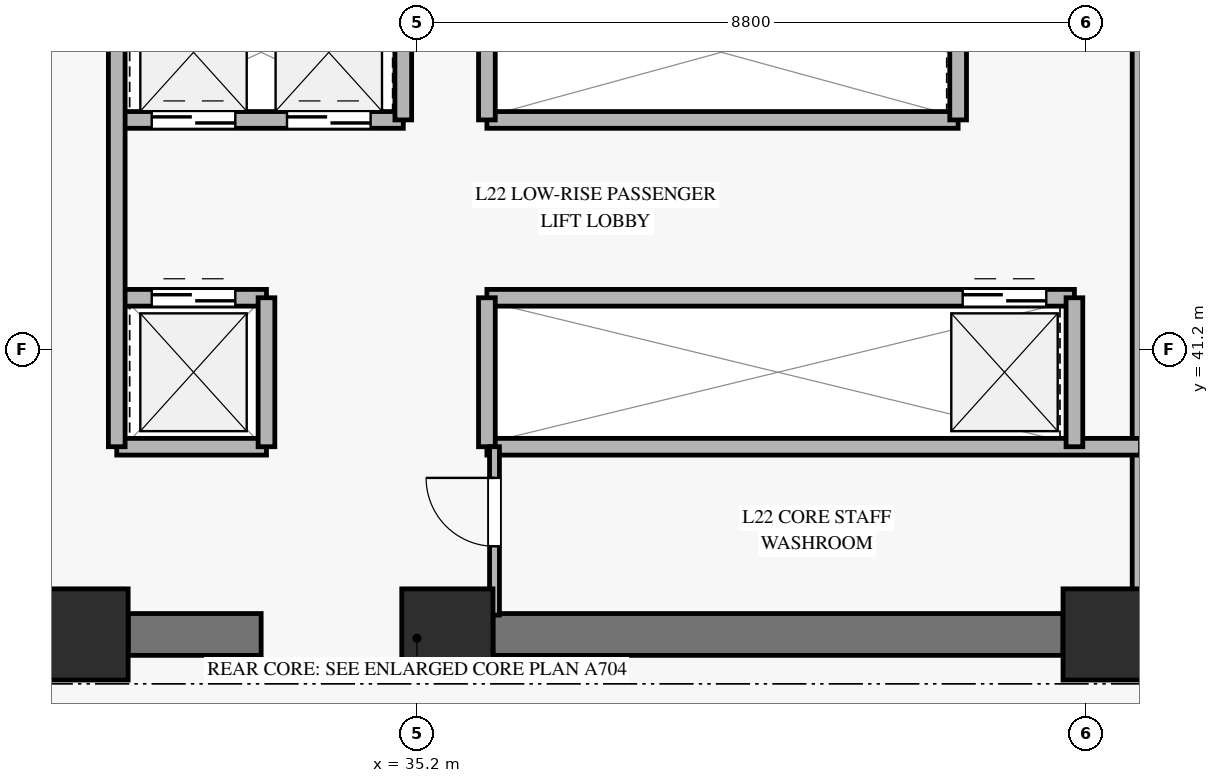
"""IFC4 building model, lengths in metres.
Left out: names, types, materials, properties, quantities, classifications, styles, units other than length and angle.
Written with IfcOpenShell. Run it as: python <this file> out.ifc"""

import sys

from ifc_helpers import new_model, si_unit, direction, frame, frame_2d, origin, origin_2d, place, context, subcontext, project, spatial, rectangle, extrude, source, transform, mapped, element, fill, save


model = new_model("IFC4")
c1 = context("Model", 3, precision=1e-05, world=origin(), true_north=direction((0.0, 1.0)))
c2 = subcontext(c1, "Body", "Model", "MODEL_VIEW")
j1 = project(units=[si_unit("LENGTHUNIT", "METRE"), si_unit("PLANEANGLEUNIT", "RADIAN")], contexts=[c1])
p1 = place(None, origin())
s1 = spatial("IfcSite", under=j1, at=p1, CompositionType="ELEMENT")
p2 = place(p1, origin())
s2 = spatial("IfcBuilding", under=s1, at=p2, CompositionType="ELEMENT")
p3 = place(p2, frame((0.0, 0.0, 91.3)))
s3 = spatial("IfcBuildingStorey", under=s2, at=p3, CompositionType="ELEMENT", Elevation=91.3)
m1 = source(origin(), c2, "Body", "SweptSolid", [
    extrude(rectangle(XDim=1.2, YDim=1.2, at=origin_2d()), origin(), (0.0, 0.0, 1.0), 3.62),
])
for number, where, z_axis, x_axis in (
    (1, (30.8, 37.45, 0.0), (0.0, 0.0, 1.0), (1.0, 0.0, 0.0)),
    (2, (35.6, 37.45, 0.0), (0.0, 0.0, 1.0), (1.0, 0.0, 0.0)),
    (3, (44.3, 37.45, 0.0), (0.0, 0.0, 1.0), (1.0, 0.0, 0.0)),
):
    element("IfcColumn", number, at=place(p3, frame(where, z_axis=z_axis, x_axis=x_axis)), inside=s3, PredefinedType="PILASTER", context=c2, shape_type="MappedRepresentation", body=[
        mapped(m1, transform((0.0, 0.0, 0.0), x_axis=(1.0, 0.0, 0.0), y_axis=(0.0, 1.0, 0.0), z_axis=(0.0, 0.0, 1.0), scale=1.0)),
    ])
p4 = place(p3, frame((31.4, 37.45, 0.0), z_axis=(0.0, 0.0, 1.0), x_axis=(1.0, 0.0, 0.0)))
e4 = element("IfcWall", 4, at=p4, inside=s3, PredefinedType="SHEAR", context=c2, shape_type="SweptSolid", body=[
    extrude(rectangle(XDim=1.75, YDim=0.55, at=frame_2d((0.875, 0.0))), origin(), (0.0, 0.0, 1.0), 3.62),
])
p5 = place(p3, frame((36.2, 37.45, 0.0), z_axis=(0.0, 0.0, 1.0), x_axis=(1.0, 0.0, 0.0)))
e5 = element("IfcWall", 5, at=p5, inside=s3, PredefinedType="SHEAR", context=c2, shape_type="SweptSolid", body=[
    extrude(rectangle(XDim=7.5, YDim=0.55, at=frame_2d((3.75, 0.0))), origin(), (0.0, 0.0, 1.0), 3.62),
])
p6 = place(p3, frame((44.72, 37.705, 0.0), z_axis=(0.0, 0.0, 1.0), x_axis=(0.0, 1.0, 0.0)))
e6 = element("IfcWall", 6, at=p6, inside=s3, PredefinedType="SOLIDWALL", context=c2, shape_type="SweptSolid", body=[
    extrude(rectangle(XDim=7.515, YDim=0.22, at=frame_2d((3.757, 0.0))), origin(), (0.0, 0.0, 1.0), 3.62),
])
p7 = place(p3, frame((31.25, 44.22, 0.0), z_axis=(0.0, 0.0, 1.0), x_axis=(1.0, 0.0, 0.0)))
e7 = element("IfcWall", 7, at=p7, inside=s3, PredefinedType="SOLIDWALL", context=c2, shape_type="SweptSolid", body=[
    extrude(rectangle(XDim=3.77, YDim=0.22, at=frame_2d((1.885, 0.0))), origin(), (0.0, 0.0, 1.0), 3.62),
])
p8 = place(p7, frame((0.46, 0.0, 0.0)))
e8 = element("IfcOpeningElement", 8, at=p8, cuts=e7, PredefinedType="OPENING", context=c2, shape_type="SweptSolid", body=[
    extrude(rectangle(XDim=1.1, YDim=2.2, at=frame_2d((0.55, 1.1))), frame((0.0, 0.12, 0.0), z_axis=(0.0, -1.0, 0.0), x_axis=(1.0, 0.0, 0.0)), (0.0, 0.0, 1.0), 0.24),
])
p9 = place(p7, frame((2.24, 0.0, 0.0)))
e9 = element("IfcOpeningElement", 9, at=p9, cuts=e7, PredefinedType="OPENING", context=c2, shape_type="SweptSolid", body=[
    extrude(rectangle(XDim=1.1, YDim=2.2, at=frame_2d((0.55, 1.1))), frame((0.0, 0.12, 0.0), z_axis=(0.0, -1.0, 0.0), x_axis=(1.0, 0.0, 0.0)), (0.0, 0.0, 1.0), 0.24),
])
p10 = place(p3, frame((36.12, 44.22, 0.0), z_axis=(0.0, 0.0, 1.0), x_axis=(1.0, 0.0, 0.0)))
e10 = element("IfcWall", 10, at=p10, inside=s3, PredefinedType="SOLIDWALL", context=c2, shape_type="SweptSolid", body=[
    extrude(rectangle(XDim=6.2, YDim=0.22, at=frame_2d((3.1, 0.0))), origin(), (0.0, 0.0, 1.0), 3.62),
])
for number, where, z_axis, x_axis in (
    (11, (35.02, 44.22, 0.0), (0.0, 0.0, 1.0), (0.0, 1.0, 0.0)),
    (12, (36.12, 44.22, 0.0), (0.0, 0.0, 1.0), (0.0, 1.0, 0.0)),
    (13, (42.32, 44.22, 0.0), (0.0, 0.0, 1.0), (0.0, 1.0, 0.0)),
):
    element("IfcWall", number, at=place(p3, frame(where, z_axis=z_axis, x_axis=x_axis)), inside=s3, PredefinedType="SOLIDWALL", context=c2, shape_type="SweptSolid", body=[
        extrude(rectangle(XDim=2.075, YDim=0.22, at=frame_2d((1.038, 0.0))), origin(), (0.0, 0.0, 1.0), 3.62),
    ])
p11 = place(p3, frame((31.25, 41.88, 0.0), z_axis=(0.0, 0.0, 1.0), x_axis=(1.0, 0.0, 0.0)))
e14 = element("IfcWall", 14, at=p11, inside=s3, PredefinedType="SOLIDWALL", context=c2, shape_type="SweptSolid", body=[
    extrude(rectangle(XDim=1.97, YDim=0.22, at=frame_2d((0.985, 0.0))), origin(), (0.0, 0.0, 1.0), 3.62),
])
p12 = place(p11, frame((0.46, 0.0, 0.0)))
e15 = element("IfcOpeningElement", 15, at=p12, cuts=e14, PredefinedType="OPENING", context=c2, shape_type="SweptSolid", body=[
    extrude(rectangle(XDim=1.1, YDim=2.2, at=frame_2d((0.55, 1.1))), frame((0.0, 0.12, 0.0), z_axis=(0.0, -1.0, 0.0), x_axis=(1.0, 0.0, 0.0)), (0.0, 0.0, 1.0), 0.24),
])
p13 = place(p3, frame((36.12, 41.88, 0.0), z_axis=(0.0, 0.0, 1.0), x_axis=(1.0, 0.0, 0.0)))
e16 = element("IfcWall", 16, at=p13, inside=s3, PredefinedType="SOLIDWALL", context=c2, shape_type="SweptSolid", body=[
    extrude(rectangle(XDim=7.73, YDim=0.22, at=frame_2d((3.865, 0.0))), origin(), (0.0, 0.0, 1.0), 3.62),
])
p14 = place(p13, frame((6.26, 0.0, 0.0)))
e17 = element("IfcOpeningElement", 17, at=p14, cuts=e16, PredefinedType="OPENING", context=c2, shape_type="SweptSolid", body=[
    extrude(rectangle(XDim=1.1, YDim=2.2, at=frame_2d((0.55, 1.1))), frame((0.0, 0.12, 0.0), z_axis=(0.0, -1.0, 0.0), x_axis=(1.0, 0.0, 0.0)), (0.0, 0.0, 1.0), 0.24),
])
p15 = place(p3, frame((31.25, 39.92, 0.0), z_axis=(0.0, 0.0, 1.0), x_axis=(1.0, 0.0, 0.0)))
e18 = element("IfcWall", 18, at=p15, inside=s3, PredefinedType="SOLIDWALL", context=c2, shape_type="SweptSolid", body=[
    extrude(rectangle(XDim=1.97, YDim=0.22, at=frame_2d((0.985, 0.0))), origin(), (0.0, 0.0, 1.0), 3.62),
])
p16 = place(p3, frame((33.22, 39.92, 0.0), z_axis=(0.0, 0.0, 1.0), x_axis=(0.0, 1.0, 0.0)))
e19 = element("IfcWall", 19, at=p16, inside=s3, PredefinedType="SOLIDWALL", context=c2, shape_type="SweptSolid", body=[
    extrude(rectangle(XDim=1.96, YDim=0.22, at=frame_2d((0.98, 0.0))), origin(), (0.0, 0.0, 1.0), 3.62),
])
p17 = place(p3, frame((36.12, 39.92, 0.0), z_axis=(0.0, 0.0, 1.0), x_axis=(1.0, 0.0, 0.0)))
e20 = element("IfcWall", 20, at=p17, inside=s3, PredefinedType="SOLIDWALL", context=c2, shape_type="SweptSolid", body=[
    extrude(rectangle(XDim=8.6, YDim=0.22, at=frame_2d((4.3, 0.0))), origin(), (0.0, 0.0, 1.0), 2.905),
])
p18 = place(p3, frame((36.12, 39.92, 0.0), z_axis=(0.0, 0.0, 1.0), x_axis=(0.0, 1.0, 0.0)))
e21 = element("IfcWall", 21, at=p18, inside=s3, PredefinedType="SOLIDWALL", context=c2, shape_type="SweptSolid", body=[
    extrude(rectangle(XDim=1.96, YDim=0.22, at=frame_2d((0.98, 0.0))), origin(), (0.0, 0.0, 1.0), 3.62),
])
p19 = place(p3, frame((31.25, 39.92, 0.0), z_axis=(0.0, 0.0, 1.0), x_axis=(0.0, 1.0, 0.0)))
e22 = element("IfcWall", 22, at=p19, inside=s3, PredefinedType="SOLIDWALL", context=c2, shape_type="SweptSolid", body=[
    extrude(rectangle(XDim=6.375, YDim=0.22, at=frame_2d((3.188, 0.0))), origin(), (0.0, 0.0, 1.0), 3.62),
])
p20 = place(p3, frame((43.85, 39.92, 0.0), z_axis=(0.0, 0.0, 1.0), x_axis=(0.0, 1.0, 0.0)))
e23 = element("IfcWall", 23, at=p20, inside=s3, PredefinedType="SOLIDWALL", context=c2, shape_type="SweptSolid", body=[
    extrude(rectangle(XDim=1.96, YDim=0.22, at=frame_2d((0.98, 0.0))), origin(), (0.0, 0.0, 1.0), 3.62),
])
p21 = place(p3, frame((36.22, 37.705, 0.0), z_axis=(0.0, 0.0, 1.0), x_axis=(0.0, 1.0, 0.0)))
e24 = element("IfcWall", 24, at=p21, inside=s3, PredefinedType="PARTITIONING", context=c2, shape_type="SweptSolid", body=[
    extrude(rectangle(XDim=2.215, YDim=0.13, at=frame_2d((1.107, 0.0))), origin(), (0.0, 0.0, 1.0), 3.62),
])
p22 = place(p21, frame((0.905, 0.0, 0.0)))
e25 = element("IfcOpeningElement", 25, at=p22, cuts=e24, PredefinedType="OPENING", context=c2, shape_type="SweptSolid", body=[
    extrude(rectangle(XDim=0.9, YDim=2.1, at=frame_2d((0.45, 1.05))), frame((0.0, 0.075, 0.0), z_axis=(0.0, -1.0, 0.0), x_axis=(1.0, 0.0, 0.0)), (0.0, 0.0, 1.0), 0.15),
])
m2 = source(origin(), c2, "Body", "SweptSolid", [
    extrude(rectangle(XDim=1.1, YDim=2.2, at=frame_2d((0.55, 1.1))), frame((0.0, 0.025, 0.0), z_axis=(0.0, -1.0, 0.0), x_axis=(1.0, 0.0, 0.0)), (0.0, 0.0, 1.0), 0.05),
])
p23 = place(p8, origin())
e26 = element("IfcDoor", 26, at=p23, inside=s3, OperationType="SLIDING_TO_LEFT", PredefinedType="DOOR", context=c2, shape_type="MappedRepresentation", body=[
    mapped(m2, transform((0.0, 0.0, 0.0), x_axis=(1.0, 0.0, 0.0), y_axis=(0.0, 1.0, 0.0), z_axis=(0.0, 0.0, 1.0), scale=1.0)),
])
fill(e8, e26)
p24 = place(p9, origin())
e27 = element("IfcDoor", 27, at=p24, inside=s3, OperationType="SLIDING_TO_LEFT", PredefinedType="DOOR", context=c2, shape_type="MappedRepresentation", body=[
    mapped(m2, transform((0.0, 0.0, 0.0), x_axis=(1.0, 0.0, 0.0), y_axis=(0.0, 1.0, 0.0), z_axis=(0.0, 0.0, 1.0), scale=1.0)),
])
fill(e9, e27)
p25 = place(p12, origin())
e28 = element("IfcDoor", 28, at=p25, inside=s3, OperationType="SLIDING_TO_LEFT", PredefinedType="DOOR", context=c2, shape_type="MappedRepresentation", body=[
    mapped(m2, transform((0.0, 0.0, 0.0), x_axis=(1.0, 0.0, 0.0), y_axis=(0.0, 1.0, 0.0), z_axis=(0.0, 0.0, 1.0), scale=1.0)),
])
fill(e15, e28)
p26 = place(p14, origin())
e29 = element("IfcDoor", 29, at=p26, inside=s3, OperationType="SLIDING_TO_LEFT", PredefinedType="DOOR", context=c2, shape_type="MappedRepresentation", body=[
    mapped(m2, transform((0.0, 0.0, 0.0), x_axis=(1.0, 0.0, 0.0), y_axis=(0.0, 1.0, 0.0), z_axis=(0.0, 0.0, 1.0), scale=1.0)),
])
fill(e17, e29)
m3 = source(origin(), c2, "Body", "SweptSolid", [
    extrude(rectangle(XDim=0.9, YDim=2.1, at=frame_2d((0.45, 1.05))), frame((0.0, 0.025, 0.0), z_axis=(0.0, -1.0, 0.0), x_axis=(1.0, 0.0, 0.0)), (0.0, 0.0, 1.0), 0.05),
])
p27 = place(p22, origin())
e30 = element("IfcDoor", 30, at=p27, inside=s3, OperationType="SINGLE_SWING_RIGHT", PredefinedType="DOOR", context=c2, shape_type="MappedRepresentation", body=[
    mapped(m3, transform((0.0, 0.0, 0.0), x_axis=(1.0, 0.0, 0.0), y_axis=(0.0, 1.0, 0.0), z_axis=(0.0, 0.0, 1.0), scale=1.0)),
])
fill(e25, e30)
save(model, sys.argv[1])
